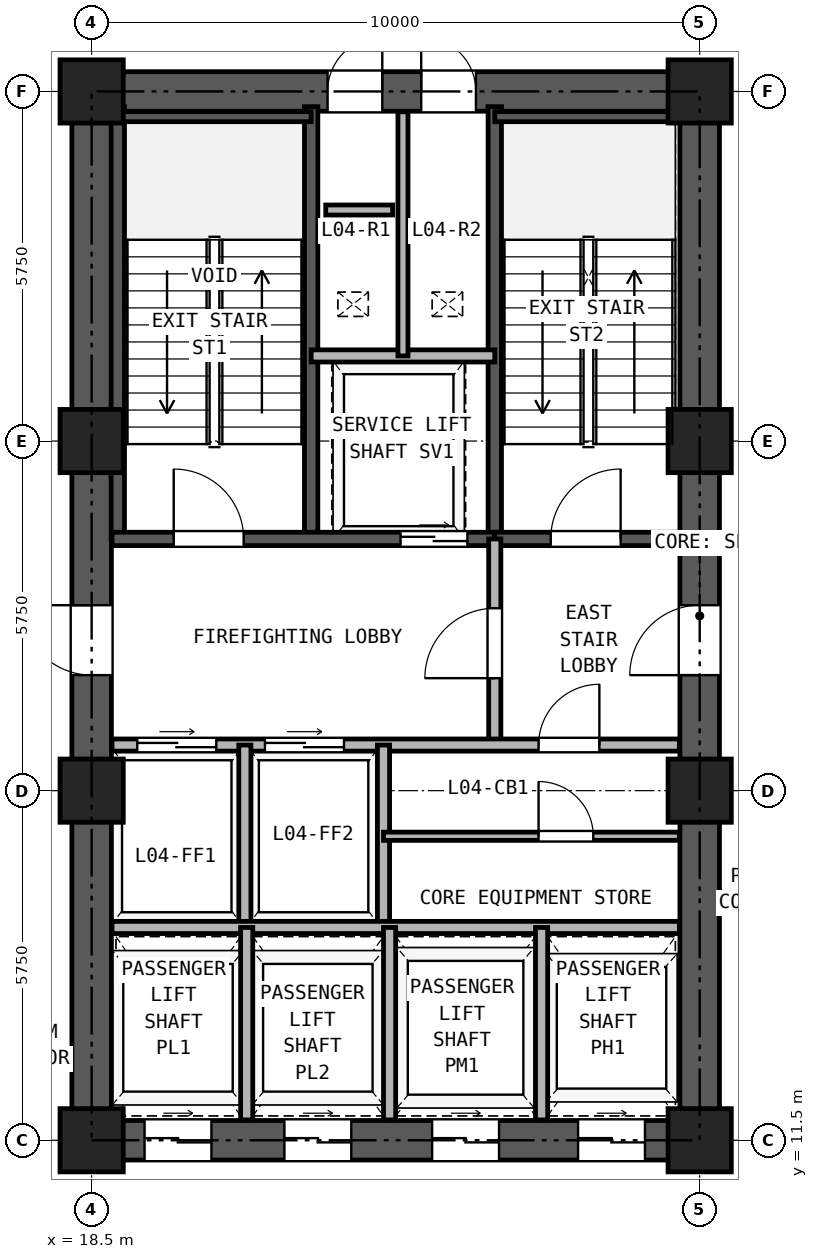
"""IFC4 building model, lengths in metres.
Left out: names, types, materials, properties, quantities, classifications, styles, units other than length and angle.
Written with IfcOpenShell. Run it as: python <this file> out.ifc"""

import sys

from ifc_helpers import new_model, si_unit, direction, frame, frame_2d, origin, origin_2d, place, context, subcontext, project, spatial, rectangle, hollow_rectangle, extrude, source, transform, mapped, element, fill, save


model = new_model("IFC4")
c1 = context("Model", 3, precision=1e-05, world=origin(), true_north=direction((0.0, 1.0)))
c2 = subcontext(c1, "Body", "Model", "MODEL_VIEW")
j1 = project(units=[si_unit("LENGTHUNIT", "METRE"), si_unit("PLANEANGLEUNIT", "RADIAN")], contexts=[c1])
p1 = place(None, origin())
s1 = spatial("IfcSite", under=j1, at=p1, CompositionType="ELEMENT")
p2 = place(p1, origin())
s2 = spatial("IfcBuilding", under=s1, at=p2, CompositionType="ELEMENT")
p3 = place(p2, frame((0.0, 0.0, 18.0)))
s3 = spatial("IfcBuildingStorey", under=s2, at=p3, CompositionType="ELEMENT", Elevation=18.0)
m1 = source(origin(), c2, "Body", "SweptSolid", [
    extrude(hollow_rectangle(XDim=1.04, YDim=1.04, WallThickness=0.065, at=origin_2d()), origin(), (0.0, 0.0, 1.0), 4.14),
])
for number, where, z_axis, x_axis in (
    (1, (18.5, 11.5, 0.0), (0.0, 0.0, 1.0), (1.0, 0.0, 0.0)),
    (2, (18.5, 17.25, 0.0), (0.0, 0.0, 1.0), (1.0, 0.0, 0.0)),
    (3, (18.5, 23.0, 0.0), (0.0, 0.0, 1.0), (1.0, 0.0, 0.0)),
    (4, (18.5, 28.75, 0.0), (0.0, 0.0, 1.0), (1.0, 0.0, 0.0)),
    (5, (28.5, 11.5, 0.0), (0.0, 0.0, 1.0), (1.0, 0.0, 0.0)),
    (6, (28.5, 17.25, 0.0), (0.0, 0.0, 1.0), (1.0, 0.0, 0.0)),
    (7, (28.5, 23.0, 0.0), (0.0, 0.0, 1.0), (1.0, 0.0, 0.0)),
    (8, (28.5, 28.75, 0.0), (0.0, 0.0, 1.0), (1.0, 0.0, 0.0)),
):
    element("IfcColumn", number, at=place(p3, frame(where, z_axis=z_axis, x_axis=x_axis)), inside=s3, PredefinedType="COLUMN", context=c2, shape_type="MappedRepresentation", body=[
        mapped(m1, transform((0.0, 0.0, 0.0), x_axis=(1.0, 0.0, 0.0), y_axis=(0.0, 1.0, 0.0), z_axis=(0.0, 0.0, 1.0), scale=1.0)),
    ])
p4 = place(p3, frame((18.175, 11.5, 0.0), z_axis=(0.0, 0.0, 1.0), x_axis=(1.0, 0.0, 0.0)))
e9 = element("IfcWall", 9, at=p4, inside=s3, PredefinedType="SHEAR", context=c2, shape_type="SweptSolid", body=[
    extrude(rectangle(XDim=10.65, YDim=0.65, at=frame_2d((5.325, 0.0))), origin(), (0.0, 0.0, 1.0), 4.14),
])
p5 = place(p4, frame((1.195, 0.0, 0.0)))
e10 = element("IfcOpeningElement", 10, at=p5, cuts=e9, PredefinedType="OPENING", context=c2, shape_type="SweptSolid", body=[
    extrude(rectangle(XDim=1.1, YDim=2.25, at=frame_2d((0.55, 1.125))), frame((0.0, 0.335, 0.0), z_axis=(0.0, -1.0, 0.0), x_axis=(1.0, 0.0, 0.0)), (0.0, 0.0, 1.0), 0.67),
])
p6 = place(p4, frame((3.495, 0.0, 0.0)))
e11 = element("IfcOpeningElement", 11, at=p6, cuts=e9, PredefinedType="OPENING", context=c2, shape_type="SweptSolid", body=[
    extrude(rectangle(XDim=1.1, YDim=2.25, at=frame_2d((0.55, 1.125))), frame((0.0, 0.335, 0.0), z_axis=(0.0, -1.0, 0.0), x_axis=(1.0, 0.0, 0.0)), (0.0, 0.0, 1.0), 0.67),
])
p7 = place(p4, frame((5.925, 0.0, 0.0)))
e12 = element("IfcOpeningElement", 12, at=p7, cuts=e9, PredefinedType="OPENING", context=c2, shape_type="SweptSolid", body=[
    extrude(rectangle(XDim=1.1, YDim=2.25, at=frame_2d((0.55, 1.125))), frame((0.0, 0.335, 0.0), z_axis=(0.0, -1.0, 0.0), x_axis=(1.0, 0.0, 0.0)), (0.0, 0.0, 1.0), 0.67),
])
p8 = place(p4, frame((8.325, 0.0, 0.0)))
e13 = element("IfcOpeningElement", 13, at=p8, cuts=e9, PredefinedType="OPENING", context=c2, shape_type="SweptSolid", body=[
    extrude(rectangle(XDim=1.1, YDim=2.25, at=frame_2d((0.55, 1.125))), frame((0.0, 0.335, 0.0), z_axis=(0.0, -1.0, 0.0), x_axis=(1.0, 0.0, 0.0)), (0.0, 0.0, 1.0), 0.67),
])
p9 = place(p3, frame((18.175, 28.75, 0.0), z_axis=(0.0, 0.0, 1.0), x_axis=(1.0, 0.0, 0.0)))
e14 = element("IfcWall", 14, at=p9, inside=s3, PredefinedType="SHEAR", context=c2, shape_type="SweptSolid", body=[
    extrude(rectangle(XDim=10.65, YDim=0.65, at=frame_2d((5.325, 0.0))), origin(), (0.0, 0.0, 1.0), 4.14),
])
p10 = place(p9, frame((4.205, 0.0, 0.0)))
e15 = element("IfcOpeningElement", 15, at=p10, cuts=e14, PredefinedType="OPENING", context=c2, shape_type="SweptSolid", body=[
    extrude(rectangle(XDim=0.9, YDim=2.05, at=frame_2d((0.45, 1.025))), frame((0.0, 0.335, 0.0), z_axis=(0.0, -1.0, 0.0), x_axis=(1.0, 0.0, 0.0)), (0.0, 0.0, 1.0), 0.67),
])
p11 = place(p9, frame((5.745, 0.0, 0.0)))
e16 = element("IfcOpeningElement", 16, at=p11, cuts=e14, PredefinedType="OPENING", context=c2, shape_type="SweptSolid", body=[
    extrude(rectangle(XDim=0.9, YDim=2.05, at=frame_2d((0.45, 1.025))), frame((0.0, 0.335, 0.0), z_axis=(0.0, -1.0, 0.0), x_axis=(1.0, 0.0, 0.0)), (0.0, 0.0, 1.0), 0.67),
])
p12 = place(p3, frame((18.5, 11.825, 0.0), z_axis=(0.0, 0.0, 1.0), x_axis=(0.0, 1.0, 0.0)))
e17 = element("IfcWall", 17, at=p12, inside=s3, PredefinedType="SHEAR", context=c2, shape_type="SweptSolid", body=[
    extrude(rectangle(XDim=16.6, YDim=0.65, at=frame_2d((8.3, 0.0))), origin(), (0.0, 0.0, 1.0), 4.14),
])
p13 = place(p12, frame((7.325, 0.0, 0.0)))
e18 = element("IfcOpeningElement", 18, at=p13, cuts=e17, PredefinedType="OPENING", context=c2, shape_type="SweptSolid", body=[
    extrude(rectangle(XDim=1.15, YDim=2.2, at=frame_2d((0.575, 1.1))), frame((0.0, 0.335, 0.0), z_axis=(0.0, -1.0, 0.0), x_axis=(1.0, 0.0, 0.0)), (0.0, 0.0, 1.0), 0.67),
])
p14 = place(p3, frame((28.5, 11.825, 0.0), z_axis=(0.0, 0.0, 1.0), x_axis=(0.0, 1.0, 0.0)))
e19 = element("IfcWall", 19, at=p14, inside=s3, PredefinedType="SHEAR", context=c2, shape_type="SweptSolid", body=[
    extrude(rectangle(XDim=16.6, YDim=0.65, at=frame_2d((8.3, 0.0))), origin(), (0.0, 0.0, 1.0), 4.14),
])
p15 = place(p14, frame((7.325, 0.0, 0.0)))
e20 = element("IfcOpeningElement", 20, at=p15, cuts=e19, PredefinedType="OPENING", context=c2, shape_type="SweptSolid", body=[
    extrude(rectangle(XDim=1.15, YDim=2.2, at=frame_2d((0.575, 1.1))), frame((0.0, 0.335, 0.0), z_axis=(0.0, -1.0, 0.0), x_axis=(1.0, 0.0, 0.0)), (0.0, 0.0, 1.0), 0.67),
])
for number, where, z_axis, x_axis in (
    (21, (18.93, 21.39, 0.0), (0.0, 0.0, 1.0), (0.0, 1.0, 0.0)),
    (22, (22.11, 21.39, 0.0), (0.0, 0.0, 1.0), (0.0, 1.0, 0.0)),
    (23, (25.13, 21.39, 0.0), (0.0, 0.0, 1.0), (0.0, 1.0, 0.0)),
):
    element("IfcWall", number, at=place(p3, frame(where, z_axis=z_axis, x_axis=x_axis)), inside=s3, PredefinedType="SOLIDWALL", context=c2, shape_type="SweptSolid", body=[
        extrude(rectangle(XDim=7.11, YDim=0.22, at=frame_2d((3.555, 0.0))), origin(), (0.0, 0.0, 1.0), 4.14),
    ])
p16 = place(p3, frame((18.835, 28.335, 0.0), z_axis=(0.0, 0.0, 1.0), x_axis=(1.0, 0.0, 0.0)))
e24 = element("IfcWall", 24, at=p16, inside=s3, PredefinedType="PARTITIONING", context=c2, shape_type="SweptSolid", body=[
    extrude(rectangle(XDim=3.275, YDim=0.165, at=frame_2d((1.638, 0.0))), origin(), (0.0, 0.0, 1.0), 4.14),
])
p17 = place(p3, frame((25.13, 28.335, 0.0), z_axis=(0.0, 0.0, 1.0), x_axis=(1.0, 0.0, 0.0)))
e25 = element("IfcWall", 25, at=p17, inside=s3, PredefinedType="PARTITIONING", context=c2, shape_type="SweptSolid", body=[
    extrude(rectangle(XDim=3.035, YDim=0.165, at=frame_2d((1.518, 0.0))), origin(), (0.0, 0.0, 1.0), 4.14),
])
p18 = place(p3, frame((18.835, 21.39, 0.0), z_axis=(0.0, 0.0, 1.0), x_axis=(1.0, 0.0, 0.0)))
e26 = element("IfcWall", 26, at=p18, inside=s3, PredefinedType="SOLIDWALL", context=c2, shape_type="SweptSolid", body=[
    extrude(rectangle(XDim=6.295, YDim=0.22, at=frame_2d((3.147, 0.0))), origin(), (0.0, 0.0, 1.0), 4.14),
])
p19 = place(p18, frame((1.015, 0.0, 0.0)))
e27 = element("IfcOpeningElement", 27, at=p19, cuts=e26, PredefinedType="OPENING", context=c2, shape_type="SweptSolid", body=[
    extrude(rectangle(XDim=1.15, YDim=2.2, at=frame_2d((0.575, 1.1))), frame((0.0, 0.12, 0.0), z_axis=(0.0, -1.0, 0.0), x_axis=(1.0, 0.0, 0.0)), (0.0, 0.0, 1.0), 0.24),
])
p20 = place(p18, frame((4.745, 0.0, 0.0)))
e28 = element("IfcOpeningElement", 28, at=p20, cuts=e26, PredefinedType="OPENING", context=c2, shape_type="SweptSolid", body=[
    extrude(rectangle(XDim=1.1, YDim=2.25, at=frame_2d((0.55, 1.125))), frame((0.0, 0.12, 0.0), z_axis=(0.0, -1.0, 0.0), x_axis=(1.0, 0.0, 0.0)), (0.0, 0.0, 1.0), 0.24),
])
p21 = place(p3, frame((25.13, 21.39, 0.0), z_axis=(0.0, 0.0, 1.0), x_axis=(1.0, 0.0, 0.0)))
e29 = element("IfcWall", 29, at=p21, inside=s3, PredefinedType="SOLIDWALL", context=c2, shape_type="SweptSolid", body=[
    extrude(rectangle(XDim=3.035, YDim=0.22, at=frame_2d((1.518, 0.0))), origin(), (0.0, 0.0, 1.0), 4.14),
])
p22 = place(p21, frame((0.92, 0.0, 0.0)))
e30 = element("IfcOpeningElement", 30, at=p22, cuts=e29, PredefinedType="OPENING", context=c2, shape_type="SweptSolid", body=[
    extrude(rectangle(XDim=1.15, YDim=2.2, at=frame_2d((0.575, 1.1))), frame((0.0, 0.12, 0.0), z_axis=(0.0, -1.0, 0.0), x_axis=(1.0, 0.0, 0.0)), (0.0, 0.0, 1.0), 0.24),
])
p23 = place(p3, frame((22.11, 24.4, 0.0), z_axis=(0.0, 0.0, 1.0), x_axis=(1.0, 0.0, 0.0)))
e31 = element("IfcWall", 31, at=p23, inside=s3, PredefinedType="PARTITIONING", context=c2, shape_type="SweptSolid", body=[
    extrude(rectangle(XDim=3.02, YDim=0.2, at=frame_2d((1.51, 0.0))), origin(), (0.0, 0.0, 1.0), 4.14),
])
p24 = place(p3, frame((23.62, 24.4, 0.0), z_axis=(0.0, 0.0, 1.0), x_axis=(0.0, 1.0, 0.0)))
e32 = element("IfcWall", 32, at=p24, inside=s3, PredefinedType="PARTITIONING", context=c2, shape_type="SweptSolid", body=[
    extrude(rectangle(XDim=4.015, YDim=0.165, at=frame_2d((2.008, 0.0))), origin(), (0.0, 0.0, 1.0), 4.14),
])
p25 = place(p3, frame((25.13, 18.0, 0.0), z_axis=(0.0, 0.0, 1.0), x_axis=(0.0, 1.0, 0.0)))
e33 = element("IfcWall", 33, at=p25, inside=s3, PredefinedType="PARTITIONING", context=c2, shape_type="SweptSolid", body=[
    extrude(rectangle(XDim=3.39, YDim=0.2, at=frame_2d((1.695, 0.0))), origin(), (0.0, 0.0, 1.0), 4.14),
])
p26 = place(p25, frame((1.1, 0.0, 0.0)))
e34 = element("IfcOpeningElement", 34, at=p26, cuts=e33, PredefinedType="OPENING", context=c2, shape_type="SweptSolid", body=[
    extrude(rectangle(XDim=1.15, YDim=2.2, at=frame_2d((0.575, 1.1))), frame((0.0, 0.11, 0.0), z_axis=(0.0, -1.0, 0.0), x_axis=(1.0, 0.0, 0.0)), (0.0, 0.0, 1.0), 0.22),
])
p27 = place(p3, frame((18.835, 18.0, 0.0), z_axis=(0.0, 0.0, 1.0), x_axis=(1.0, 0.0, 0.0)))
e35 = element("IfcWall", 35, at=p27, inside=s3, PredefinedType="PARTITIONING", context=c2, shape_type="SweptSolid", body=[
    extrude(rectangle(XDim=9.33, YDim=0.2, at=frame_2d((4.665, 0.0))), origin(), (0.0, 0.0, 1.0), 4.14),
])
p28 = place(p27, frame((0.415, 0.0, 0.0)))
e36 = element("IfcOpeningElement", 36, at=p28, cuts=e35, PredefinedType="OPENING", context=c2, shape_type="SweptSolid", body=[
    extrude(rectangle(XDim=1.3, YDim=2.3, at=frame_2d((0.65, 1.15))), frame((0.0, 0.11, 0.0), z_axis=(0.0, -1.0, 0.0), x_axis=(1.0, 0.0, 0.0)), (0.0, 0.0, 1.0), 0.22),
])
p29 = place(p27, frame((2.515, 0.0, 0.0)))
e37 = element("IfcOpeningElement", 37, at=p29, cuts=e35, PredefinedType="OPENING", context=c2, shape_type="SweptSolid", body=[
    extrude(rectangle(XDim=1.3, YDim=2.3, at=frame_2d((0.65, 1.15))), frame((0.0, 0.11, 0.0), z_axis=(0.0, -1.0, 0.0), x_axis=(1.0, 0.0, 0.0)), (0.0, 0.0, 1.0), 0.22),
])
p30 = place(p27, frame((7.015, 0.0, 0.0)))
e38 = element("IfcOpeningElement", 38, at=p30, cuts=e35, PredefinedType="OPENING", context=c2, shape_type="SweptSolid", body=[
    extrude(rectangle(XDim=1.0, YDim=2.15, at=frame_2d((0.5, 1.075))), frame((0.0, 0.11, 0.0), z_axis=(0.0, -1.0, 0.0), x_axis=(1.0, 0.0, 0.0)), (0.0, 0.0, 1.0), 0.22),
])
for number, where, z_axis, x_axis in (
    (39, (21.02, 15.0, 0.0), (0.0, 0.0, 1.0), (0.0, 1.0, 0.0)),
    (40, (23.3, 15.0, 0.0), (0.0, 0.0, 1.0), (0.0, 1.0, 0.0)),
):
    element("IfcWall", number, at=place(p3, frame(where, z_axis=z_axis, x_axis=x_axis)), inside=s3, PredefinedType="PARTITIONING", context=c2, shape_type="SweptSolid", body=[
        extrude(rectangle(XDim=3.0, YDim=0.2, at=frame_2d((1.5, 0.0))), origin(), (0.0, 0.0, 1.0), 4.14),
    ])
p31 = place(p3, frame((18.835, 15.0, 0.0), z_axis=(0.0, 0.0, 1.0), x_axis=(1.0, 0.0, 0.0)))
e41 = element("IfcWall", 41, at=p31, inside=s3, PredefinedType="PARTITIONING", context=c2, shape_type="SweptSolid", body=[
    extrude(rectangle(XDim=9.33, YDim=0.2, at=frame_2d((4.665, 0.0))), origin(), (0.0, 0.0, 1.0), 4.14),
])
p32 = place(p3, frame((23.3, 16.5, 0.0), z_axis=(0.0, 0.0, 1.0), x_axis=(1.0, 0.0, 0.0)))
e42 = element("IfcWall", 42, at=p32, inside=s3, PredefinedType="PARTITIONING", context=c2, shape_type="SweptSolid", body=[
    extrude(rectangle(XDim=4.865, YDim=0.135, at=frame_2d((2.433, 0.0))), origin(), (0.0, 0.0, 1.0), 4.14),
])
p33 = place(p32, frame((2.55, 0.0, 0.0)))
e43 = element("IfcOpeningElement", 43, at=p33, cuts=e42, PredefinedType="OPENING", context=c2, shape_type="SweptSolid", body=[
    extrude(rectangle(XDim=0.9, YDim=2.05, at=frame_2d((0.45, 1.025))), frame((0.0, 0.077, 0.0), z_axis=(0.0, -1.0, 0.0), x_axis=(1.0, 0.0, 0.0)), (0.0, 0.0, 1.0), 0.155),
])
for number, where, z_axis, x_axis in (
    (44, (21.05, 11.835, 0.0), (0.0, 0.0, 1.0), (0.0, 1.0, 0.0)),
    (45, (23.4, 11.835, 0.0), (0.0, 0.0, 1.0), (0.0, 1.0, 0.0)),
    (46, (25.9, 11.835, 0.0), (0.0, 0.0, 1.0), (0.0, 1.0, 0.0)),
):
    element("IfcWall", number, at=place(p3, frame(where, z_axis=z_axis, x_axis=x_axis)), inside=s3, PredefinedType="PARTITIONING", context=c2, shape_type="SweptSolid", body=[
        extrude(rectangle(XDim=3.165, YDim=0.2, at=frame_2d((1.583, 0.0))), origin(), (0.0, 0.0, 1.0), 4.14),
    ])
p34 = place(p3, frame((22.35, 26.8, 0.0), z_axis=(0.0, 0.0, 1.0), x_axis=(1.0, 0.0, 0.0)))
e47 = element("IfcWall", 47, at=p34, inside=s3, PredefinedType="PARTITIONING", context=c2, shape_type="SweptSolid", body=[
    extrude(rectangle(XDim=1.1, YDim=0.165, at=frame_2d((0.55, 0.0))), origin(), (0.0, 0.0, 1.0), 4.14),
])
p35 = place(p19, frame((1.15, 0.0, 0.0), z_axis=(0.0, 0.0, 1.0), x_axis=(-1.0, 0.0, 0.0)))
e48 = element("IfcDoor", 48, at=p35, inside=s3, OperationType="SINGLE_SWING_LEFT", PredefinedType="DOOR", context=c2, shape_type="SweptSolid", body=[
    extrude(rectangle(XDim=1.15, YDim=2.2, at=frame_2d((0.575, 1.1))), frame((0.0, 0.025, 0.0), z_axis=(0.0, -1.0, 0.0), x_axis=(1.0, 0.0, 0.0)), (0.0, 0.0, 1.0), 0.05),
])
fill(e27, e48)
p36 = place(p22, frame((1.15, 0.0, 0.0), z_axis=(0.0, 0.0, 1.0), x_axis=(-1.0, 0.0, 0.0)))
e49 = element("IfcDoor", 49, at=p36, inside=s3, OperationType="SINGLE_SWING_RIGHT", PredefinedType="DOOR", context=c2, shape_type="SweptSolid", body=[
    extrude(rectangle(XDim=1.15, YDim=2.2, at=frame_2d((0.575, 1.1))), frame((0.0, 0.025, 0.0), z_axis=(0.0, -1.0, 0.0), x_axis=(1.0, 0.0, 0.0)), (0.0, 0.0, 1.0), 0.05),
])
fill(e30, e49)
p37 = place(p20, frame((1.1, 0.0, 0.0), z_axis=(0.0, 0.0, 1.0), x_axis=(-1.0, 0.0, 0.0)))
e50 = element("IfcDoor", 50, at=p37, inside=s3, OperationType="DOUBLE_DOOR_SLIDING", PredefinedType="DOOR", context=c2, shape_type="SweptSolid", body=[
    extrude(rectangle(XDim=1.1, YDim=2.25, at=frame_2d((0.55, 1.125))), frame((0.0, 0.025, 0.0), z_axis=(0.0, -1.0, 0.0), x_axis=(1.0, 0.0, 0.0)), (0.0, 0.0, 1.0), 0.05),
])
fill(e28, e50)
p38 = place(p26, origin())
e51 = element("IfcDoor", 51, at=p38, inside=s3, OperationType="SINGLE_SWING_LEFT", PredefinedType="DOOR", context=c2, shape_type="SweptSolid", body=[
    extrude(rectangle(XDim=1.15, YDim=2.2, at=frame_2d((0.575, 1.1))), frame((0.0, 0.025, 0.0), z_axis=(0.0, -1.0, 0.0), x_axis=(1.0, 0.0, 0.0)), (0.0, 0.0, 1.0), 0.05),
])
fill(e34, e51)
p39 = place(p28, origin())
e52 = element("IfcDoor", 52, at=p39, inside=s3, OperationType="DOUBLE_DOOR_SLIDING", PredefinedType="DOOR", context=c2, shape_type="SweptSolid", body=[
    extrude(rectangle(XDim=1.3, YDim=2.3, at=frame_2d((0.65, 1.15))), frame((0.0, 0.025, 0.0), z_axis=(0.0, -1.0, 0.0), x_axis=(1.0, 0.0, 0.0)), (0.0, 0.0, 1.0), 0.05),
])
fill(e36, e52)
p40 = place(p29, origin())
e53 = element("IfcDoor", 53, at=p40, inside=s3, OperationType="DOUBLE_DOOR_SLIDING", PredefinedType="DOOR", context=c2, shape_type="SweptSolid", body=[
    extrude(rectangle(XDim=1.3, YDim=2.3, at=frame_2d((0.65, 1.15))), frame((0.0, 0.025, 0.0), z_axis=(0.0, -1.0, 0.0), x_axis=(1.0, 0.0, 0.0)), (0.0, 0.0, 1.0), 0.05),
])
fill(e37, e53)
p41 = place(p30, frame((1.0, 0.0, 0.0), z_axis=(0.0, 0.0, 1.0), x_axis=(-1.0, 0.0, 0.0)))
e54 = element("IfcDoor", 54, at=p41, inside=s3, OperationType="SINGLE_SWING_RIGHT", PredefinedType="DOOR", context=c2, shape_type="SweptSolid", body=[
    extrude(rectangle(XDim=1.0, YDim=2.15, at=frame_2d((0.5, 1.075))), frame((0.0, 0.025, 0.0), z_axis=(0.0, -1.0, 0.0), x_axis=(1.0, 0.0, 0.0)), (0.0, 0.0, 1.0), 0.05),
])
fill(e38, e54)
p42 = place(p33, frame((0.9, 0.0, 0.0), z_axis=(0.0, 0.0, 1.0), x_axis=(-1.0, 0.0, 0.0)))
e55 = element("IfcDoor", 55, at=p42, inside=s3, OperationType="SINGLE_SWING_LEFT", PredefinedType="DOOR", context=c2, shape_type="SweptSolid", body=[
    extrude(rectangle(XDim=0.9, YDim=2.05, at=frame_2d((0.45, 1.025))), frame((0.0, 0.025, 0.0), z_axis=(0.0, -1.0, 0.0), x_axis=(1.0, 0.0, 0.0)), (0.0, 0.0, 1.0), 0.05),
])
fill(e43, e55)
p43 = place(p13, frame((1.15, 0.0, 0.0), z_axis=(0.0, 0.0, 1.0), x_axis=(-1.0, 0.0, 0.0)))
e56 = element("IfcDoor", 56, at=p43, inside=s3, OperationType="SINGLE_SWING_RIGHT", PredefinedType="DOOR", context=c2, shape_type="SweptSolid", body=[
    extrude(rectangle(XDim=1.15, YDim=2.2, at=frame_2d((0.575, 1.1))), frame((0.0, 0.025, 0.0), z_axis=(0.0, -1.0, 0.0), x_axis=(1.0, 0.0, 0.0)), (0.0, 0.0, 1.0), 0.05),
])
fill(e18, e56)
p44 = place(p15, origin())
e57 = element("IfcDoor", 57, at=p44, inside=s3, OperationType="SINGLE_SWING_LEFT", PredefinedType="DOOR", context=c2, shape_type="SweptSolid", body=[
    extrude(rectangle(XDim=1.15, YDim=2.2, at=frame_2d((0.575, 1.1))), frame((0.0, 0.025, 0.0), z_axis=(0.0, -1.0, 0.0), x_axis=(1.0, 0.0, 0.0)), (0.0, 0.0, 1.0), 0.05),
])
fill(e20, e57)
p45 = place(p10, origin())
e58 = element("IfcDoor", 58, at=p45, inside=s3, OperationType="SINGLE_SWING_RIGHT", PredefinedType="DOOR", context=c2, shape_type="SweptSolid", body=[
    extrude(rectangle(XDim=0.9, YDim=2.05, at=frame_2d((0.45, 1.025))), frame((0.0, 0.025, 0.0), z_axis=(0.0, -1.0, 0.0), x_axis=(1.0, 0.0, 0.0)), (0.0, 0.0, 1.0), 0.05),
])
fill(e15, e58)
p46 = place(p11, origin())
e59 = element("IfcDoor", 59, at=p46, inside=s3, OperationType="SINGLE_SWING_LEFT", PredefinedType="DOOR", context=c2, shape_type="SweptSolid", body=[
    extrude(rectangle(XDim=0.9, YDim=2.05, at=frame_2d((0.45, 1.025))), frame((0.0, 0.025, 0.0), z_axis=(0.0, -1.0, 0.0), x_axis=(1.0, 0.0, 0.0)), (0.0, 0.0, 1.0), 0.05),
])
fill(e16, e59)
p47 = place(p5, frame((1.1, 0.0, 0.0), z_axis=(0.0, 0.0, 1.0), x_axis=(-1.0, 0.0, 0.0)))
e60 = element("IfcDoor", 60, at=p47, inside=s3, OperationType="DOUBLE_DOOR_SLIDING", PredefinedType="DOOR", context=c2, shape_type="SweptSolid", body=[
    extrude(rectangle(XDim=1.1, YDim=2.25, at=frame_2d((0.55, 1.125))), frame((0.0, 0.025, 0.0), z_axis=(0.0, -1.0, 0.0), x_axis=(1.0, 0.0, 0.0)), (0.0, 0.0, 1.0), 0.05),
])
fill(e10, e60)
p48 = place(p6, frame((1.1, 0.0, 0.0), z_axis=(0.0, 0.0, 1.0), x_axis=(-1.0, 0.0, 0.0)))
e61 = element("IfcDoor", 61, at=p48, inside=s3, OperationType="DOUBLE_DOOR_SLIDING", PredefinedType="DOOR", context=c2, shape_type="SweptSolid", body=[
    extrude(rectangle(XDim=1.1, YDim=2.25, at=frame_2d((0.55, 1.125))), frame((0.0, 0.025, 0.0), z_axis=(0.0, -1.0, 0.0), x_axis=(1.0, 0.0, 0.0)), (0.0, 0.0, 1.0), 0.05),
])
fill(e11, e61)
p49 = place(p7, frame((1.1, 0.0, 0.0), z_axis=(0.0, 0.0, 1.0), x_axis=(-1.0, 0.0, 0.0)))
e62 = element("IfcDoor", 62, at=p49, inside=s3, OperationType="DOUBLE_DOOR_SLIDING", PredefinedType="DOOR", context=c2, shape_type="SweptSolid", body=[
    extrude(rectangle(XDim=1.1, YDim=2.25, at=frame_2d((0.55, 1.125))), frame((0.0, 0.025, 0.0), z_axis=(0.0, -1.0, 0.0), x_axis=(1.0, 0.0, 0.0)), (0.0, 0.0, 1.0), 0.05),
])
fill(e12, e62)
p50 = place(p8, frame((1.1, 0.0, 0.0), z_axis=(0.0, 0.0, 1.0), x_axis=(-1.0, 0.0, 0.0)))
e63 = element("IfcDoor", 63, at=p50, inside=s3, OperationType="DOUBLE_DOOR_SLIDING", PredefinedType="DOOR", context=c2, shape_type="SweptSolid", body=[
    extrude(rectangle(XDim=1.1, YDim=2.25, at=frame_2d((0.55, 1.125))), frame((0.0, 0.025, 0.0), z_axis=(0.0, -1.0, 0.0), x_axis=(1.0, 0.0, 0.0)), (0.0, 0.0, 1.0), 0.05),
])
fill(e13, e63)
save(model, sys.argv[1])
